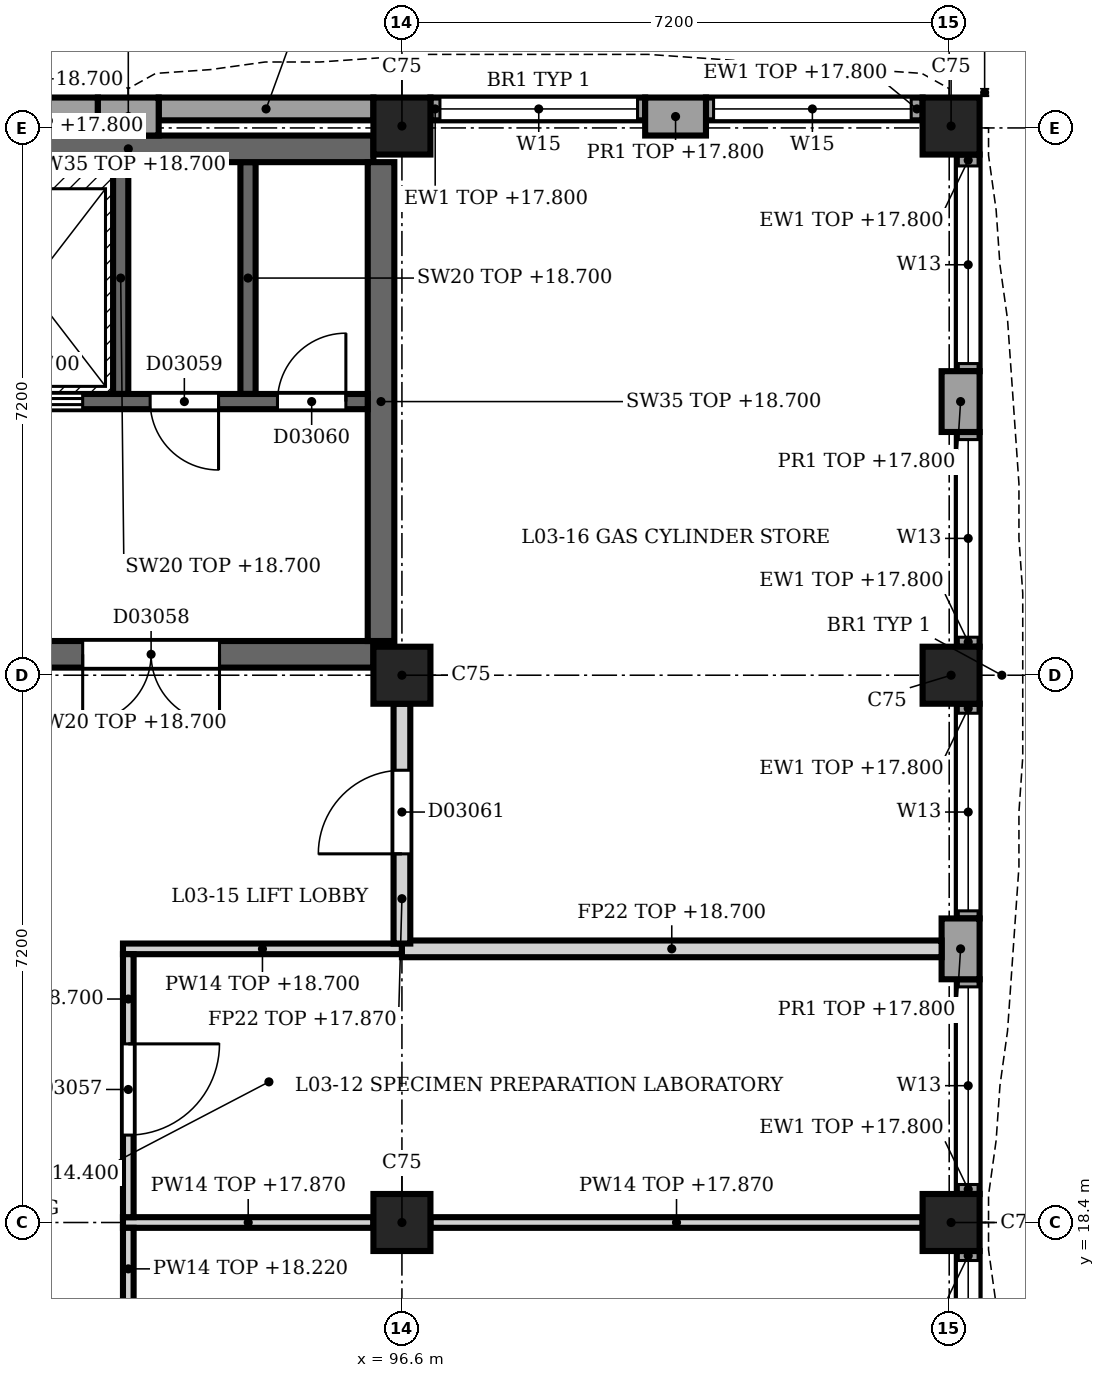
"""IFC4 building model, lengths in metres.
Left out: names, types, materials, properties, quantities, classifications, styles, units other than length and angle.
Written with IfcOpenShell. Run it as: python <this file> out.ifc"""

import sys

from ifc_helpers import new_model, si_unit, direction, frame, frame_2d, origin, origin_2d, place, context, subcontext, project, spatial, rectangle, extrude, element, fill, save


model = new_model("IFC4")
c1 = context("Model", 3, precision=1e-05, world=origin(), true_north=direction((0.0, 1.0)))
c2 = subcontext(c1, "Body", "Model", "MODEL_VIEW")
j1 = project(units=[si_unit("LENGTHUNIT", "METRE"), si_unit("PLANEANGLEUNIT", "RADIAN")], contexts=[c1])
p1 = place(None, origin())
s1 = spatial("IfcSite", under=j1, at=p1, CompositionType="ELEMENT")
p2 = place(p1, origin())
s2 = spatial("IfcBuilding", under=s1, at=p2, CompositionType="ELEMENT")
p3 = place(p2, frame((0.0, 0.0, 14.4)))
s3 = spatial("IfcBuildingStorey", under=s2, at=p3, CompositionType="ELEMENT", Elevation=14.4)
for number, where, z_axis, x_axis in (
    (1, (96.6, 18.4, 0.0), (0.0, 0.0, 1.0), (1.0, 0.0, 0.0)),
    (2, (96.6, 25.6, 0.0), (0.0, 0.0, 1.0), (1.0, 0.0, 0.0)),
    (3, (96.6, 32.825, 0.0), (0.0, 0.0, 1.0), (1.0, 0.0, 0.0)),
    (4, (103.825, 18.4, 0.0), (0.0, 0.0, 1.0), (1.0, 0.0, 0.0)),
    (5, (103.825, 25.6, 0.0), (0.0, 0.0, 1.0), (1.0, 0.0, 0.0)),
    (6, (103.825, 32.825, 0.0), (0.0, 0.0, 1.0), (1.0, 0.0, 0.0)),
):
    element("IfcColumn", number, at=place(p3, frame(where, z_axis=z_axis, x_axis=x_axis)), inside=s3, PredefinedType="COLUMN", context=c2, shape_type="SweptSolid", body=[
        extrude(rectangle(XDim=0.75, YDim=0.75, at=origin_2d()), origin(), (0.0, 0.0, 1.0), 4.5),
    ])
p4 = place(p3, frame((92.6, 32.95, 0.0), z_axis=(0.0, 0.0, 1.0), x_axis=(1.0, 0.0, 0.0)))
e7 = element("IfcWall", 7, at=p4, inside=s3, PredefinedType="SOLIDWALL", context=c2, shape_type="SweptSolid", body=[
    extrude(rectangle(XDim=0.8, YDim=0.5, at=frame_2d((0.4, 0.0))), origin(), (0.0, 0.0, 1.0), 3.4),
])
p5 = place(p3, frame((99.8, 32.95, 0.0), z_axis=(0.0, 0.0, 1.0), x_axis=(1.0, 0.0, 0.0)))
e8 = element("IfcWall", 8, at=p5, inside=s3, PredefinedType="SOLIDWALL", context=c2, shape_type="SweptSolid", body=[
    extrude(rectangle(XDim=0.8, YDim=0.5, at=frame_2d((0.4, 0.0))), origin(), (0.0, 0.0, 1.0), 3.4),
])
for number, where, z_axis, x_axis in (
    (9, (89.775, 33.05, 0.0), (0.0, 0.0, 1.0), (1.0, 0.0, 0.0)),
    (10, (93.4, 33.05, 0.0), (0.0, 0.0, 1.0), (1.0, 0.0, 0.0)),
):
    element("IfcWall", number, at=place(p3, frame(where, z_axis=z_axis, x_axis=x_axis)), inside=s3, PredefinedType="SOLIDWALL", context=c2, shape_type="SweptSolid", body=[
        extrude(rectangle(XDim=2.825, YDim=0.3, at=frame_2d((1.413, 0.0))), origin(), (0.0, 0.0, 1.0), 3.4),
    ])
p6 = place(p3, frame((96.975, 33.05, 0.0), z_axis=(0.0, 0.0, 1.0), x_axis=(1.0, 0.0, 0.0)))
e11 = element("IfcWall", 11, at=p6, inside=s3, PredefinedType="SOLIDWALL", context=c2, shape_type="SweptSolid", body=[
    extrude(rectangle(XDim=2.825, YDim=0.3, at=frame_2d((1.413, 0.0))), origin(), (0.0, 0.0, 1.0), 3.4),
])
p7 = place(p6, frame((0.125, 0.0, 1.0)))
e12 = element("IfcOpeningElement", 12, at=p7, cuts=e11, PredefinedType="OPENING", context=c2, shape_type="SweptSolid", body=[
    extrude(rectangle(XDim=2.6, YDim=2.0, at=frame_2d((1.3, 1.0))), frame((0.0, 0.16, 0.0), z_axis=(0.0, -1.0, 0.0), x_axis=(1.0, 0.0, 0.0)), (0.0, 0.0, 1.0), 0.32),
])
p8 = place(p3, frame((100.6, 33.05, 0.0), z_axis=(0.0, 0.0, 1.0), x_axis=(1.0, 0.0, 0.0)))
e13 = element("IfcWall", 13, at=p8, inside=s3, PredefinedType="SOLIDWALL", context=c2, shape_type="SweptSolid", body=[
    extrude(rectangle(XDim=2.85, YDim=0.3, at=frame_2d((1.425, 0.0))), origin(), (0.0, 0.0, 1.0), 3.4),
])
p9 = place(p8, frame((0.1, 0.0, 1.0)))
e14 = element("IfcOpeningElement", 14, at=p9, cuts=e13, PredefinedType="OPENING", context=c2, shape_type="SweptSolid", body=[
    extrude(rectangle(XDim=2.6, YDim=2.0, at=frame_2d((1.3, 1.0))), frame((0.0, 0.16, 0.0), z_axis=(0.0, -1.0, 0.0), x_axis=(1.0, 0.0, 0.0)), (0.0, 0.0, 1.0), 0.32),
])
p10 = place(p3, frame((103.95, 29.6, 0.0), z_axis=(0.0, 0.0, 1.0), x_axis=(0.0, -1.0, 0.0)))
e15 = element("IfcWall", 15, at=p10, inside=s3, PredefinedType="SOLIDWALL", context=c2, shape_type="SweptSolid", body=[
    extrude(rectangle(XDim=0.8, YDim=0.5, at=frame_2d((0.4, 0.0))), origin(), (0.0, 0.0, 1.0), 3.4),
])
p11 = place(p3, frame((103.95, 22.4, 0.0), z_axis=(0.0, 0.0, 1.0), x_axis=(0.0, -1.0, 0.0)))
e16 = element("IfcWall", 16, at=p11, inside=s3, PredefinedType="SOLIDWALL", context=c2, shape_type="SweptSolid", body=[
    extrude(rectangle(XDim=0.8, YDim=0.5, at=frame_2d((0.4, 0.0))), origin(), (0.0, 0.0, 1.0), 3.4),
])
p12 = place(p3, frame((104.05, 32.45, 0.0), z_axis=(0.0, 0.0, 1.0), x_axis=(0.0, -1.0, 0.0)))
e17 = element("IfcWall", 17, at=p12, inside=s3, PredefinedType="SOLIDWALL", context=c2, shape_type="SweptSolid", body=[
    extrude(rectangle(XDim=2.85, YDim=0.3, at=frame_2d((1.425, 0.0))), origin(), (0.0, 0.0, 1.0), 3.4),
])
p13 = place(p12, frame((0.15, 0.0, 0.9)))
e18 = element("IfcOpeningElement", 18, at=p13, cuts=e17, PredefinedType="OPENING", context=c2, shape_type="SweptSolid", body=[
    extrude(rectangle(XDim=2.6, YDim=2.2, at=frame_2d((1.3, 1.1))), frame((0.0, 0.16, 0.0), z_axis=(0.0, -1.0, 0.0), x_axis=(1.0, 0.0, 0.0)), (0.0, 0.0, 1.0), 0.32),
])
p14 = place(p3, frame((104.05, 28.8, 0.0), z_axis=(0.0, 0.0, 1.0), x_axis=(0.0, -1.0, 0.0)))
e19 = element("IfcWall", 19, at=p14, inside=s3, PredefinedType="SOLIDWALL", context=c2, shape_type="SweptSolid", body=[
    extrude(rectangle(XDim=2.825, YDim=0.3, at=frame_2d((1.413, 0.0))), origin(), (0.0, 0.0, 1.0), 3.4),
])
p15 = place(p14, frame((0.1, 0.0, 0.9)))
e20 = element("IfcOpeningElement", 20, at=p15, cuts=e19, PredefinedType="OPENING", context=c2, shape_type="SweptSolid", body=[
    extrude(rectangle(XDim=2.6, YDim=2.2, at=frame_2d((1.3, 1.1))), frame((0.0, 0.16, 0.0), z_axis=(0.0, -1.0, 0.0), x_axis=(1.0, 0.0, 0.0)), (0.0, 0.0, 1.0), 0.32),
])
p16 = place(p3, frame((104.05, 25.225, 0.0), z_axis=(0.0, 0.0, 1.0), x_axis=(0.0, -1.0, 0.0)))
e21 = element("IfcWall", 21, at=p16, inside=s3, PredefinedType="SOLIDWALL", context=c2, shape_type="SweptSolid", body=[
    extrude(rectangle(XDim=2.825, YDim=0.3, at=frame_2d((1.413, 0.0))), origin(), (0.0, 0.0, 1.0), 3.4),
])
p17 = place(p16, frame((0.125, 0.0, 0.9)))
e22 = element("IfcOpeningElement", 22, at=p17, cuts=e21, PredefinedType="OPENING", context=c2, shape_type="SweptSolid", body=[
    extrude(rectangle(XDim=2.6, YDim=2.2, at=frame_2d((1.3, 1.1))), frame((0.0, 0.16, 0.0), z_axis=(0.0, -1.0, 0.0), x_axis=(1.0, 0.0, 0.0)), (0.0, 0.0, 1.0), 0.32),
])
p18 = place(p3, frame((104.05, 21.6, 0.0), z_axis=(0.0, 0.0, 1.0), x_axis=(0.0, -1.0, 0.0)))
e23 = element("IfcWall", 23, at=p18, inside=s3, PredefinedType="SOLIDWALL", context=c2, shape_type="SweptSolid", body=[
    extrude(rectangle(XDim=2.825, YDim=0.3, at=frame_2d((1.413, 0.0))), origin(), (0.0, 0.0, 1.0), 3.4),
])
p19 = place(p18, frame((0.1, 0.0, 0.9)))
e24 = element("IfcOpeningElement", 24, at=p19, cuts=e23, PredefinedType="OPENING", context=c2, shape_type="SweptSolid", body=[
    extrude(rectangle(XDim=2.6, YDim=2.2, at=frame_2d((1.3, 1.1))), frame((0.0, 0.16, 0.0), z_axis=(0.0, -1.0, 0.0), x_axis=(1.0, 0.0, 0.0)), (0.0, 0.0, 1.0), 0.32),
])
p20 = place(p3, frame((104.05, 18.025, 0.0), z_axis=(0.0, 0.0, 1.0), x_axis=(0.0, -1.0, 0.0)))
e25 = element("IfcWall", 25, at=p20, inside=s3, PredefinedType="SOLIDWALL", context=c2, shape_type="SweptSolid", body=[
    extrude(rectangle(XDim=2.825, YDim=0.3, at=frame_2d((1.413, 0.0))), origin(), (0.0, 0.0, 1.0), 3.4),
])
p21 = place(p20, frame((0.125, 0.0, 0.9)))
e26 = element("IfcOpeningElement", 26, at=p21, cuts=e25, PredefinedType="OPENING", context=c2, shape_type="SweptSolid", body=[
    extrude(rectangle(XDim=2.6, YDim=2.2, at=frame_2d((1.3, 1.1))), frame((0.0, 0.16, 0.0), z_axis=(0.0, -1.0, 0.0), x_axis=(1.0, 0.0, 0.0)), (0.0, 0.0, 1.0), 0.32),
])
p22 = place(p3, frame((89.775, 25.875, 0.0), z_axis=(0.0, 0.0, 1.0), x_axis=(1.0, 0.0, 0.0)))
e27 = element("IfcWall", 27, at=p22, inside=s3, PredefinedType="SHEAR", context=c2, shape_type="SweptSolid", body=[
    extrude(rectangle(XDim=6.45, YDim=0.35, at=frame_2d((3.225, 0.0))), origin(), (0.0, 0.0, 1.0), 4.3),
])
p23 = place(p22, frame((2.625, 0.0, 0.0)))
e28 = element("IfcOpeningElement", 28, at=p23, cuts=e27, PredefinedType="OPENING", context=c2, shape_type="SweptSolid", body=[
    extrude(rectangle(XDim=1.8, YDim=2.1, at=frame_2d((0.9, 1.05))), frame((0.0, 0.185, 0.0), z_axis=(0.0, -1.0, 0.0), x_axis=(1.0, 0.0, 0.0)), (0.0, 0.0, 1.0), 0.37),
])
p24 = place(p3, frame((89.775, 32.525, 0.0), z_axis=(0.0, 0.0, 1.0), x_axis=(1.0, 0.0, 0.0)))
e29 = element("IfcWall", 29, at=p24, inside=s3, PredefinedType="SHEAR", context=c2, shape_type="SweptSolid", body=[
    extrude(rectangle(XDim=6.45, YDim=0.35, at=frame_2d((3.225, 0.0))), origin(), (0.0, 0.0, 1.0), 4.3),
])
p25 = place(p3, frame((96.325, 26.05, 0.0), z_axis=(0.0, 0.0, 1.0), x_axis=(0.0, 1.0, 0.0)))
e30 = element("IfcWall", 30, at=p25, inside=s3, PredefinedType="SHEAR", context=c2, shape_type="SweptSolid", body=[
    extrude(rectangle(XDim=6.3, YDim=0.35, at=frame_2d((3.15, 0.0))), origin(), (0.0, 0.0, 1.0), 4.3),
])
p26 = place(p3, frame((96.15, 29.2, 0.0), z_axis=(0.0, 0.0, 1.0), x_axis=(-1.0, 0.0, 0.0)))
e31 = element("IfcWall", 31, at=p26, inside=s3, PredefinedType="SHEAR", context=c2, shape_type="SweptSolid", body=[
    extrude(rectangle(XDim=10.35, YDim=0.2, at=frame_2d((5.175, 0.0))), origin(), (0.0, 0.0, 1.0), 4.3),
])
p27 = place(p26, frame((8.8, 0.0, 0.0)))
e32 = element("IfcOpeningElement", 32, at=p27, cuts=e31, PredefinedType="OPENING", context=c2, shape_type="SweptSolid", body=[
    extrude(rectangle(XDim=1.1, YDim=2.1, at=frame_2d((0.55, 1.05))), frame((0.0, 0.11, 0.0), z_axis=(0.0, -1.0, 0.0), x_axis=(1.0, 0.0, 0.0)), (0.0, 0.0, 1.0), 0.22),
])
p28 = place(p26, frame((6.6, 0.0, 0.0)))
e33 = element("IfcOpeningElement", 33, at=p28, cuts=e31, PredefinedType="OPENING", context=c2, shape_type="SweptSolid", body=[
    extrude(rectangle(XDim=1.1, YDim=2.1, at=frame_2d((0.55, 1.05))), frame((0.0, 0.11, 0.0), z_axis=(0.0, -1.0, 0.0), x_axis=(1.0, 0.0, 0.0)), (0.0, 0.0, 1.0), 0.22),
])
p29 = place(p26, frame((3.75, 0.0, 0.0)))
e34 = element("IfcOpeningElement", 34, at=p29, cuts=e31, PredefinedType="OPENING", context=c2, shape_type="SweptSolid", body=[
    extrude(rectangle(XDim=1.4, YDim=2.1, at=frame_2d((0.7, 1.05))), frame((0.0, 0.11, 0.0), z_axis=(0.0, -1.0, 0.0), x_axis=(1.0, 0.0, 0.0)), (0.0, 0.0, 1.0), 0.22),
])
p30 = place(p26, frame((1.962, 0.0, 0.0)))
e35 = element("IfcOpeningElement", 35, at=p30, cuts=e31, PredefinedType="OPENING", context=c2, shape_type="SweptSolid", body=[
    extrude(rectangle(XDim=0.9, YDim=2.1, at=frame_2d((0.45, 1.05))), frame((0.0, 0.11, 0.0), z_axis=(0.0, -1.0, 0.0), x_axis=(1.0, 0.0, 0.0)), (0.0, 0.0, 1.0), 0.22),
])
p31 = place(p26, frame((0.288, 0.0, 0.0)))
e36 = element("IfcOpeningElement", 36, at=p31, cuts=e31, PredefinedType="OPENING", context=c2, shape_type="SweptSolid", body=[
    extrude(rectangle(XDim=0.9, YDim=2.1, at=frame_2d((0.45, 1.05))), frame((0.0, 0.11, 0.0), z_axis=(0.0, -1.0, 0.0), x_axis=(1.0, 0.0, 0.0)), (0.0, 0.0, 1.0), 0.22),
])
for number, where, z_axis, x_axis in (
    (37, (92.9, 29.3, 0.0), (0.0, 0.0, 1.0), (0.0, 1.0, 0.0)),
    (38, (94.575, 29.3, 0.0), (0.0, 0.0, 1.0), (0.0, 1.0, 0.0)),
):
    element("IfcWall", number, at=place(p3, frame(where, z_axis=z_axis, x_axis=x_axis)), inside=s3, PredefinedType="SHEAR", context=c2, shape_type="SweptSolid", body=[
        extrude(rectangle(XDim=3.05, YDim=0.2, at=frame_2d((1.525, 0.0))), origin(), (0.0, 0.0, 1.0), 4.3),
    ])
p32 = place(p3, frame((92.93, 18.4, 0.0), z_axis=(0.0, 0.0, 1.0), x_axis=(1.0, 0.0, 0.0)))
e39 = element("IfcWall", 39, at=p32, inside=s3, PredefinedType="PARTITIONING", context=c2, shape_type="SweptSolid", body=[
    extrude(rectangle(XDim=3.295, YDim=0.14, at=frame_2d((1.647, 0.0))), origin(), (0.0, 0.0, 1.0), 3.47),
])
p33 = place(p3, frame((96.975, 18.4, 0.0), z_axis=(0.0, 0.0, 1.0), x_axis=(1.0, 0.0, 0.0)))
e40 = element("IfcWall", 40, at=p33, inside=s3, PredefinedType="PARTITIONING", context=c2, shape_type="SweptSolid", body=[
    extrude(rectangle(XDim=6.475, YDim=0.14, at=frame_2d((3.237, 0.0))), origin(), (0.0, 0.0, 1.0), 3.47),
])
p34 = place(p3, frame((92.93, 22.0, 0.0), z_axis=(0.0, 0.0, 1.0), x_axis=(1.0, 0.0, 0.0)))
e41 = element("IfcWall", 41, at=p34, inside=s3, PredefinedType="PARTITIONING", context=c2, shape_type="SweptSolid", body=[
    extrude(rectangle(XDim=3.67, YDim=0.14, at=frame_2d((1.835, 0.0))), origin(), (0.0, 0.0, 1.0), 4.3),
])
p35 = place(p3, frame((96.6, 22.0, 0.0), z_axis=(0.0, 0.0, 1.0), x_axis=(1.0, 0.0, 0.0)))
e42 = element("IfcWall", 42, at=p35, inside=s3, PredefinedType="PARTITIONING", context=c2, shape_type="SweptSolid", body=[
    extrude(rectangle(XDim=7.1, YDim=0.22, at=frame_2d((3.55, 0.0))), origin(), (0.0, 0.0, 1.0), 4.3),
])
p36 = place(p3, frame((93.0, 18.33, 0.0), z_axis=(0.0, 0.0, 1.0), x_axis=(0.0, -1.0, 0.0)))
e43 = element("IfcWall", 43, at=p36, inside=s3, PredefinedType="PARTITIONING", context=c2, shape_type="SweptSolid", body=[
    extrude(rectangle(XDim=3.46, YDim=0.14, at=frame_2d((1.73, 0.0))), origin(), (0.0, 0.0, 1.0), 3.82),
])
p37 = place(p36, frame((1.08, 0.0, 0.0)))
e44 = element("IfcOpeningElement", 44, at=p37, cuts=e43, PredefinedType="OPENING", context=c2, shape_type="SweptSolid", body=[
    extrude(rectangle(XDim=1.3, YDim=2.1, at=frame_2d((0.65, 1.05))), frame((0.0, 0.08, 0.0), z_axis=(0.0, -1.0, 0.0), x_axis=(1.0, 0.0, 0.0)), (0.0, 0.0, 1.0), 0.16),
])
p38 = place(p3, frame((93.0, 21.93, 0.0), z_axis=(0.0, 0.0, 1.0), x_axis=(0.0, -1.0, 0.0)))
e45 = element("IfcWall", 45, at=p38, inside=s3, PredefinedType="PARTITIONING", context=c2, shape_type="SweptSolid", body=[
    extrude(rectangle(XDim=3.46, YDim=0.14, at=frame_2d((1.73, 0.0))), origin(), (0.0, 0.0, 1.0), 4.3),
])
p39 = place(p38, frame((1.18, 0.0, 0.0)))
e46 = element("IfcOpeningElement", 46, at=p39, cuts=e45, PredefinedType="OPENING", context=c2, shape_type="SweptSolid", body=[
    extrude(rectangle(XDim=1.2, YDim=2.1, at=frame_2d((0.6, 1.05))), frame((0.0, 0.08, 0.0), z_axis=(0.0, -1.0, 0.0), x_axis=(1.0, 0.0, 0.0)), (0.0, 0.0, 1.0), 0.16),
])
p40 = place(p3, frame((96.6, 25.225, 0.0), z_axis=(0.0, 0.0, 1.0), x_axis=(0.0, -1.0, 0.0)))
e47 = element("IfcWall", 47, at=p40, inside=s3, PredefinedType="PARTITIONING", context=c2, shape_type="SweptSolid", body=[
    extrude(rectangle(XDim=3.155, YDim=0.22, at=frame_2d((1.578, 0.0))), origin(), (0.0, 0.0, 1.0), 3.47),
])
p41 = place(p40, frame((0.875, 0.0, 0.0)))
e48 = element("IfcOpeningElement", 48, at=p41, cuts=e47, PredefinedType="OPENING", context=c2, shape_type="SweptSolid", body=[
    extrude(rectangle(XDim=1.1, YDim=2.3, at=frame_2d((0.55, 1.15))), frame((0.0, 0.12, 0.0), z_axis=(0.0, -1.0, 0.0), x_axis=(1.0, 0.0, 0.0)), (0.0, 0.0, 1.0), 0.24),
])
p42 = place(p7, origin())
e49 = element("IfcWindow", 49, at=p42, inside=s3, PartitioningType="SINGLE_PANEL", PredefinedType="WINDOW", context=c2, shape_type="SweptSolid", body=[
    extrude(rectangle(XDim=2.6, YDim=2.0, at=frame_2d((1.3, 1.0))), frame((0.0, 0.03, 0.0), z_axis=(0.0, -1.0, 0.0), x_axis=(1.0, 0.0, 0.0)), (0.0, 0.0, 1.0), 0.06),
])
fill(e12, e49)
p43 = place(p9, origin())
e50 = element("IfcWindow", 50, at=p43, inside=s3, PartitioningType="SINGLE_PANEL", PredefinedType="WINDOW", context=c2, shape_type="SweptSolid", body=[
    extrude(rectangle(XDim=2.6, YDim=2.0, at=frame_2d((1.3, 1.0))), frame((0.0, 0.03, 0.0), z_axis=(0.0, -1.0, 0.0), x_axis=(1.0, 0.0, 0.0)), (0.0, 0.0, 1.0), 0.06),
])
fill(e14, e50)
p44 = place(p13, origin())
e51 = element("IfcWindow", 51, at=p44, inside=s3, PartitioningType="SINGLE_PANEL", PredefinedType="WINDOW", context=c2, shape_type="SweptSolid", body=[
    extrude(rectangle(XDim=2.6, YDim=2.2, at=frame_2d((1.3, 1.1))), frame((0.0, 0.03, 0.0), z_axis=(0.0, -1.0, 0.0), x_axis=(1.0, 0.0, 0.0)), (0.0, 0.0, 1.0), 0.06),
])
fill(e18, e51)
p45 = place(p15, origin())
e52 = element("IfcWindow", 52, at=p45, inside=s3, PartitioningType="SINGLE_PANEL", PredefinedType="WINDOW", context=c2, shape_type="SweptSolid", body=[
    extrude(rectangle(XDim=2.6, YDim=2.2, at=frame_2d((1.3, 1.1))), frame((0.0, 0.03, 0.0), z_axis=(0.0, -1.0, 0.0), x_axis=(1.0, 0.0, 0.0)), (0.0, 0.0, 1.0), 0.06),
])
fill(e20, e52)
p46 = place(p17, origin())
e53 = element("IfcWindow", 53, at=p46, inside=s3, PartitioningType="SINGLE_PANEL", PredefinedType="WINDOW", context=c2, shape_type="SweptSolid", body=[
    extrude(rectangle(XDim=2.6, YDim=2.2, at=frame_2d((1.3, 1.1))), frame((0.0, 0.03, 0.0), z_axis=(0.0, -1.0, 0.0), x_axis=(1.0, 0.0, 0.0)), (0.0, 0.0, 1.0), 0.06),
])
fill(e22, e53)
p47 = place(p19, origin())
e54 = element("IfcWindow", 54, at=p47, inside=s3, PartitioningType="SINGLE_PANEL", PredefinedType="WINDOW", context=c2, shape_type="SweptSolid", body=[
    extrude(rectangle(XDim=2.6, YDim=2.2, at=frame_2d((1.3, 1.1))), frame((0.0, 0.03, 0.0), z_axis=(0.0, -1.0, 0.0), x_axis=(1.0, 0.0, 0.0)), (0.0, 0.0, 1.0), 0.06),
])
fill(e24, e54)
p48 = place(p21, origin())
e55 = element("IfcWindow", 55, at=p48, inside=s3, PartitioningType="SINGLE_PANEL", PredefinedType="WINDOW", context=c2, shape_type="SweptSolid", body=[
    extrude(rectangle(XDim=2.6, YDim=2.2, at=frame_2d((1.3, 1.1))), frame((0.0, 0.03, 0.0), z_axis=(0.0, -1.0, 0.0), x_axis=(1.0, 0.0, 0.0)), (0.0, 0.0, 1.0), 0.06),
])
fill(e26, e55)
p49 = place(p23, origin())
e56 = element("IfcDoor", 56, at=p49, inside=s3, OperationType="SINGLE_SWING_LEFT", PredefinedType="DOOR", context=c2, shape_type="SweptSolid", body=[
    extrude(rectangle(XDim=1.8, YDim=2.1, at=frame_2d((0.9, 1.05))), frame((0.0, 0.025, 0.0), z_axis=(0.0, -1.0, 0.0), x_axis=(1.0, 0.0, 0.0)), (0.0, 0.0, 1.0), 0.05),
])
fill(e28, e56)
p50 = place(p29, origin())
e57 = element("IfcDoor", 57, at=p50, inside=s3, OperationType="DOUBLE_DOOR_SLIDING", PredefinedType="DOOR", context=c2, shape_type="SweptSolid", body=[
    extrude(rectangle(XDim=1.4, YDim=2.1, at=frame_2d((0.7, 1.05))), frame((0.0, 0.025, 0.0), z_axis=(0.0, -1.0, 0.0), x_axis=(1.0, 0.0, 0.0)), (0.0, 0.0, 1.0), 0.05),
])
fill(e34, e57)
p51 = place(p30, origin())
e58 = element("IfcDoor", 58, at=p51, inside=s3, OperationType="SINGLE_SWING_LEFT", PredefinedType="DOOR", context=c2, shape_type="SweptSolid", body=[
    extrude(rectangle(XDim=0.9, YDim=2.1, at=frame_2d((0.45, 1.05))), frame((0.0, 0.025, 0.0), z_axis=(0.0, -1.0, 0.0), x_axis=(1.0, 0.0, 0.0)), (0.0, 0.0, 1.0), 0.05),
])
fill(e35, e58)
p52 = place(p31, origin())
e59 = element("IfcDoor", 59, at=p52, inside=s3, OperationType="SINGLE_SWING_LEFT", PredefinedType="DOOR", context=c2, shape_type="SweptSolid", body=[
    extrude(rectangle(XDim=0.9, YDim=2.1, at=frame_2d((0.45, 1.05))), frame((0.0, 0.025, 0.0), z_axis=(0.0, -1.0, 0.0), x_axis=(1.0, 0.0, 0.0)), (0.0, 0.0, 1.0), 0.05),
])
fill(e36, e59)
p53 = place(p39, origin())
e60 = element("IfcDoor", 60, at=p53, inside=s3, OperationType="SINGLE_SWING_RIGHT", PredefinedType="DOOR", context=c2, shape_type="SweptSolid", body=[
    extrude(rectangle(XDim=1.2, YDim=2.1, at=frame_2d((0.6, 1.05))), frame((0.0, 0.025, 0.0), z_axis=(0.0, -1.0, 0.0), x_axis=(1.0, 0.0, 0.0)), (0.0, 0.0, 1.0), 0.05),
])
fill(e46, e60)
p54 = place(p41, origin())
e61 = element("IfcDoor", 61, at=p54, inside=s3, OperationType="SINGLE_SWING_LEFT", PredefinedType="DOOR", context=c2, shape_type="SweptSolid", body=[
    extrude(rectangle(XDim=1.1, YDim=2.3, at=frame_2d((0.55, 1.15))), frame((0.0, 0.025, 0.0), z_axis=(0.0, -1.0, 0.0), x_axis=(1.0, 0.0, 0.0)), (0.0, 0.0, 1.0), 0.05),
])
fill(e48, e61)
save(model, sys.argv[1])
